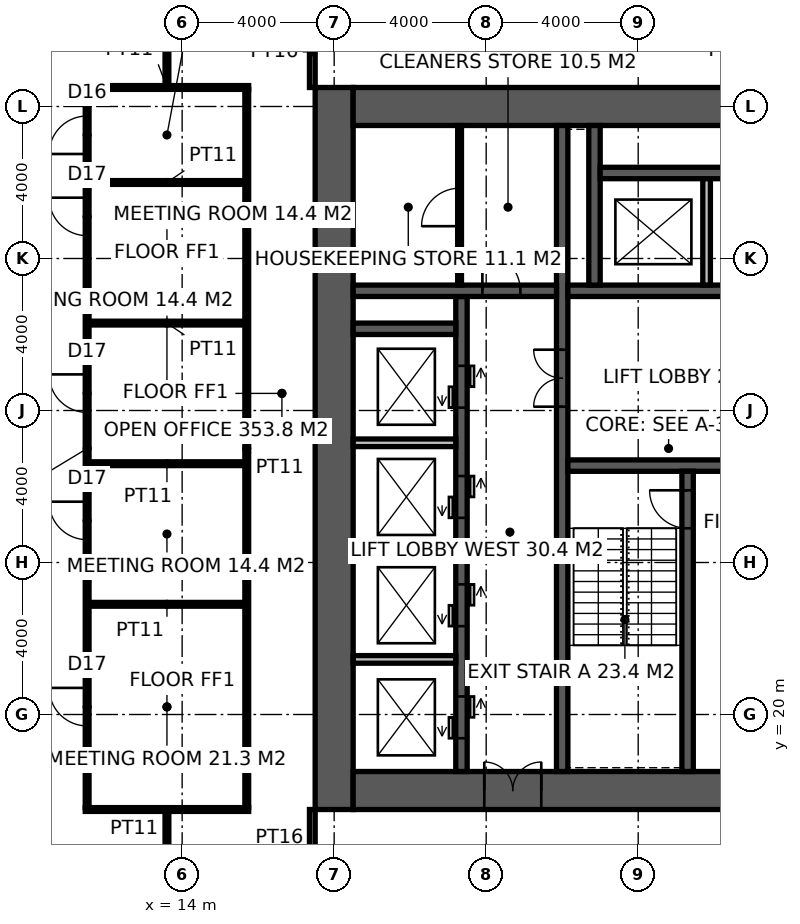
"""IFC4 building model, lengths in metres.
Left out: names, types, materials, properties, quantities, classifications, styles, units other than length and angle.
Written with IfcOpenShell. Run it as: python <this file> out.ifc"""

import sys

from ifc_helpers import new_model, si_unit, direction, frame, frame_2d, origin, place, context, subcontext, project, spatial, rectangle, extrude, element, fill, save


model = new_model("IFC4")
c1 = context("Model", 3, precision=1e-05, world=origin(), true_north=direction((0.0, 1.0)))
c2 = subcontext(c1, "Body", "Model", "MODEL_VIEW")
j1 = project(units=[si_unit("LENGTHUNIT", "METRE"), si_unit("PLANEANGLEUNIT", "RADIAN")], contexts=[c1])
p1 = place(None, origin())
s1 = spatial("IfcSite", under=j1, at=p1, CompositionType="ELEMENT")
p2 = place(p1, origin())
s2 = spatial("IfcBuilding", under=s1, at=p2, CompositionType="ELEMENT")
p3 = place(p2, frame((0.0, 0.0, 159.8)))
s3 = spatial("IfcBuildingStorey", under=s2, at=p3, CompositionType="ELEMENT", Elevation=159.8)
p4 = place(p3, frame((18.0, 17.5, -0.15), z_axis=(0.0, 0.0, 1.0), x_axis=(0.0, 1.0, 0.0)))
e1 = element("IfcWall", 1, at=p4, inside=s3, PredefinedType="SHEAR", context=c2, shape_type="SweptSolid", body=[
    extrude(rectangle(XDim=19.0, YDim=1.0, at=frame_2d((9.5, 0.0))), origin(), (0.0, 0.0, 1.0), 4.0),
])
p5 = place(p3, frame((18.5, 18.0, -0.15), z_axis=(0.0, 0.0, 1.0), x_axis=(1.0, 0.0, 0.0)))
e2 = element("IfcWall", 2, at=p5, inside=s3, PredefinedType="SHEAR", context=c2, shape_type="SweptSolid", body=[
    extrude(rectangle(XDim=17.6, YDim=1.0, at=frame_2d((8.8, 0.0))), origin(), (0.0, 0.0, 1.0), 4.0),
])
p6 = place(p5, frame((3.45, 0.0, 0.15)))
e3 = element("IfcOpeningElement", 3, at=p6, cuts=e2, PredefinedType="OPENING", context=c2, shape_type="SweptSolid", body=[
    extrude(rectangle(XDim=1.5, YDim=2.4, at=frame_2d((0.75, 1.2))), frame((0.0, 0.51, 0.0), z_axis=(0.0, -1.0, 0.0), x_axis=(1.0, 0.0, 0.0)), (0.0, 0.0, 1.0), 1.02),
])
p7 = place(p3, frame((18.5, 36.0, -0.15), z_axis=(0.0, 0.0, 1.0), x_axis=(1.0, 0.0, 0.0)))
e4 = element("IfcWall", 4, at=p7, inside=s3, PredefinedType="SHEAR", context=c2, shape_type="SweptSolid", body=[
    extrude(rectangle(XDim=17.6, YDim=1.0, at=frame_2d((8.8, 0.0))), origin(), (0.0, 0.0, 1.0), 4.0),
])
p8 = place(p3, frame((24.0, 18.5, -0.15), z_axis=(0.0, 0.0, 1.0), x_axis=(0.0, 1.0, 0.0)))
e5 = element("IfcWall", 5, at=p8, inside=s3, PredefinedType="SHEAR", context=c2, shape_type="SweptSolid", body=[
    extrude(rectangle(XDim=17.0, YDim=0.3, at=frame_2d((8.5, 0.0))), origin(), (0.0, 0.0, 1.0), 4.0),
])
p9 = place(p8, frame((9.6, 0.0, 0.15)))
e6 = element("IfcOpeningElement", 6, at=p9, cuts=e5, PredefinedType="OPENING", context=c2, shape_type="SweptSolid", body=[
    extrude(rectangle(XDim=1.5, YDim=2.4, at=frame_2d((0.75, 1.2))), frame((0.0, 0.16, 0.0), z_axis=(0.0, -1.0, 0.0), x_axis=(1.0, 0.0, 0.0)), (0.0, 0.0, 1.0), 0.32),
])
p10 = place(p3, frame((24.15, 26.55, -0.15), z_axis=(0.0, 0.0, 1.0), x_axis=(1.0, 0.0, 0.0)))
e7 = element("IfcWall", 7, at=p10, inside=s3, PredefinedType="SHEAR", context=c2, shape_type="SweptSolid", body=[
    extrude(rectangle(XDim=11.25, YDim=0.3, at=frame_2d((5.625, 0.0))), origin(), (0.0, 0.0, 1.0), 4.0),
])
p11 = place(p10, frame((9.25, 0.0, 0.15)))
e8 = element("IfcOpeningElement", 8, at=p11, cuts=e7, PredefinedType="OPENING", context=c2, shape_type="SweptSolid", body=[
    extrude(rectangle(XDim=1.0, YDim=2.2, at=frame_2d((0.5, 1.1))), frame((0.0, 0.16, 0.0), z_axis=(0.0, -1.0, 0.0), x_axis=(1.0, 0.0, 0.0)), (0.0, 0.0, 1.0), 0.32),
])
p12 = place(p10, frame((4.9, 0.0, 0.15)))
e9 = element("IfcOpeningElement", 9, at=p12, cuts=e7, PredefinedType="OPENING", context=c2, shape_type="SweptSolid", body=[
    extrude(rectangle(XDim=1.5, YDim=2.4, at=frame_2d((0.75, 1.2))), frame((0.0, 0.16, 0.0), z_axis=(0.0, -1.0, 0.0), x_axis=(1.0, 0.0, 0.0)), (0.0, 0.0, 1.0), 0.32),
])
p13 = place(p3, frame((27.3, 18.5, -0.15), z_axis=(0.0, 0.0, 1.0), x_axis=(0.0, 1.0, 0.0)))
e10 = element("IfcWall", 10, at=p13, inside=s3, PredefinedType="SHEAR", context=c2, shape_type="SweptSolid", body=[
    extrude(rectangle(XDim=7.9, YDim=0.3, at=frame_2d((3.95, 0.0))), origin(), (0.0, 0.0, 1.0), 4.0),
])
p14 = place(p13, frame((6.4, 0.0, 0.15)))
e11 = element("IfcOpeningElement", 11, at=p14, cuts=e10, PredefinedType="OPENING", context=c2, shape_type="SweptSolid", body=[
    extrude(rectangle(XDim=1.0, YDim=2.2, at=frame_2d((0.5, 1.1))), frame((0.0, 0.16, 0.0), z_axis=(0.0, -1.0, 0.0), x_axis=(1.0, 0.0, 0.0)), (0.0, 0.0, 1.0), 0.32),
])
p15 = place(p3, frame((24.15, 31.15, -0.15), z_axis=(0.0, 0.0, 1.0), x_axis=(1.0, 0.0, 0.0)))
e12 = element("IfcWall", 12, at=p15, inside=s3, PredefinedType="SHEAR", context=c2, shape_type="SweptSolid", body=[
    extrude(rectangle(XDim=11.25, YDim=0.3, at=frame_2d((5.625, 0.0))), origin(), (0.0, 0.0, 1.0), 4.0),
])
p16 = place(p15, frame((7.25, 0.0, 0.15)))
e13 = element("IfcOpeningElement", 13, at=p16, cuts=e12, PredefinedType="OPENING", context=c2, shape_type="SweptSolid", body=[
    extrude(rectangle(XDim=1.4, YDim=2.4, at=frame_2d((0.7, 1.2))), frame((0.0, 0.16, 0.0), z_axis=(0.0, -1.0, 0.0), x_axis=(1.0, 0.0, 0.0)), (0.0, 0.0, 1.0), 0.32),
])
p17 = place(p3, frame((21.35, 18.5, -0.15), z_axis=(0.0, 0.0, 1.0), x_axis=(0.0, 1.0, 0.0)))
e14 = element("IfcWall", 14, at=p17, inside=s3, PredefinedType="SHEAR", context=c2, shape_type="SweptSolid", body=[
    extrude(rectangle(XDim=12.5, YDim=0.3, at=frame_2d((6.25, 0.0))), origin(), (0.0, 0.0, 1.0), 4.0),
])
p18 = place(p17, frame((0.875, 0.0, 0.15)))
e15 = element("IfcOpeningElement", 15, at=p18, cuts=e14, PredefinedType="OPENING", context=c2, shape_type="SweptSolid", body=[
    extrude(rectangle(XDim=1.1, YDim=2.2, at=frame_2d((0.55, 1.1))), frame((0.0, 0.16, 0.0), z_axis=(0.0, -1.0, 0.0), x_axis=(1.0, 0.0, 0.0)), (0.0, 0.0, 1.0), 0.32),
])
p19 = place(p17, frame((3.825, 0.0, 0.15)))
e16 = element("IfcOpeningElement", 16, at=p19, cuts=e14, PredefinedType="OPENING", context=c2, shape_type="SweptSolid", body=[
    extrude(rectangle(XDim=1.1, YDim=2.2, at=frame_2d((0.55, 1.1))), frame((0.0, 0.16, 0.0), z_axis=(0.0, -1.0, 0.0), x_axis=(1.0, 0.0, 0.0)), (0.0, 0.0, 1.0), 0.32),
])
p20 = place(p17, frame((6.675, 0.0, 0.15)))
e17 = element("IfcOpeningElement", 17, at=p20, cuts=e14, PredefinedType="OPENING", context=c2, shape_type="SweptSolid", body=[
    extrude(rectangle(XDim=1.1, YDim=2.2, at=frame_2d((0.55, 1.1))), frame((0.0, 0.16, 0.0), z_axis=(0.0, -1.0, 0.0), x_axis=(1.0, 0.0, 0.0)), (0.0, 0.0, 1.0), 0.32),
])
p21 = place(p17, frame((9.575, 0.0, 0.15)))
e18 = element("IfcOpeningElement", 18, at=p21, cuts=e14, PredefinedType="OPENING", context=c2, shape_type="SweptSolid", body=[
    extrude(rectangle(XDim=1.1, YDim=2.2, at=frame_2d((0.55, 1.1))), frame((0.0, 0.16, 0.0), z_axis=(0.0, -1.0, 0.0), x_axis=(1.0, 0.0, 0.0)), (0.0, 0.0, 1.0), 0.32),
])
p22 = place(p3, frame((18.5, 31.15, -0.15), z_axis=(0.0, 0.0, 1.0), x_axis=(1.0, 0.0, 0.0)))
e19 = element("IfcWall", 19, at=p22, inside=s3, PredefinedType="SHEAR", context=c2, shape_type="SweptSolid", body=[
    extrude(rectangle(XDim=5.35, YDim=0.3, at=frame_2d((2.675, 0.0))), origin(), (0.0, 0.0, 1.0), 4.0),
])
p23 = place(p22, frame((3.4, 0.0, 0.15)))
e20 = element("IfcOpeningElement", 20, at=p23, cuts=e19, PredefinedType="OPENING", context=c2, shape_type="SweptSolid", body=[
    extrude(rectangle(XDim=1.0, YDim=2.2, at=frame_2d((0.5, 1.1))), frame((0.0, 0.16, 0.0), z_axis=(0.0, -1.0, 0.0), x_axis=(1.0, 0.0, 0.0)), (0.0, 0.0, 1.0), 0.32),
])
p24 = place(p3, frame((18.5, 30.15, -0.15), z_axis=(0.0, 0.0, 1.0), x_axis=(1.0, 0.0, 0.0)))
e21 = element("IfcWall", 21, at=p24, inside=s3, PredefinedType="SHEAR", context=c2, shape_type="SweptSolid", body=[
    extrude(rectangle(XDim=2.7, YDim=0.3, at=frame_2d((1.35, 0.0))), origin(), (0.0, 0.0, 1.0), 4.0),
])
p25 = place(p3, frame((24.85, 31.3, -0.15), z_axis=(0.0, 0.0, 1.0), x_axis=(0.0, 1.0, 0.0)))
e22 = element("IfcWall", 22, at=p25, inside=s3, PredefinedType="SHEAR", context=c2, shape_type="SweptSolid", body=[
    extrude(rectangle(XDim=4.2, YDim=0.3, at=frame_2d((2.1, 0.0))), origin(), (0.0, 0.0, 1.0), 4.0),
])
p26 = place(p3, frame((25.0, 34.25, -0.15), z_axis=(0.0, 0.0, 1.0), x_axis=(1.0, 0.0, 0.0)))
e23 = element("IfcWall", 23, at=p26, inside=s3, PredefinedType="SHEAR", context=c2, shape_type="SweptSolid", body=[
    extrude(rectangle(XDim=8.6, YDim=0.3, at=frame_2d((4.3, 0.0))), origin(), (0.0, 0.0, 1.0), 4.0),
])
p27 = place(p3, frame((27.8, 31.3, -0.15), z_axis=(0.0, 0.0, 1.0), x_axis=(0.0, 1.0, 0.0)))
e24 = element("IfcWall", 24, at=p27, inside=s3, PredefinedType="SOLIDWALL", context=c2, shape_type="SweptSolid", body=[
    extrude(rectangle(XDim=2.8, YDim=0.2, at=frame_2d((1.4, 0.0))), origin(), (0.0, 0.0, 1.0), 4.0),
])
for number, where, z_axis, x_axis in (
    (25, (18.5, 21.45, -0.15), (0.0, 0.0, 1.0), (1.0, 0.0, 0.0)),
    (26, (18.5, 24.3, -0.15), (0.0, 0.0, 1.0), (1.0, 0.0, 0.0)),
    (27, (18.5, 27.15, -0.15), (0.0, 0.0, 1.0), (1.0, 0.0, 0.0)),
):
    element("IfcWall", number, at=place(p3, frame(where, z_axis=z_axis, x_axis=x_axis)), inside=s3, PredefinedType="SOLIDWALL", context=c2, shape_type="SweptSolid", body=[
        extrude(rectangle(XDim=2.7, YDim=0.2, at=frame_2d((1.35, 0.0))), origin(), (0.0, 0.0, 1.0), 4.0),
    ])
p28 = place(p3, frame((21.3, 31.3, 0.0), z_axis=(0.0, 0.0, 1.0), x_axis=(0.0, 1.0, 0.0)))
e28 = element("IfcWall", 28, at=p28, inside=s3, PredefinedType="PARTITIONING", context=c2, shape_type="SweptSolid", body=[
    extrude(rectangle(XDim=4.2, YDim=0.1, at=frame_2d((2.1, 0.0))), origin(), (0.0, 0.0, 1.0), 3.85),
])
p29 = place(p28, frame((1.55, 0.0, 0.0)))
e29 = element("IfcOpeningElement", 29, at=p29, cuts=e28, PredefinedType="OPENING", context=c2, shape_type="SweptSolid", body=[
    extrude(rectangle(XDim=1.0, YDim=2.2, at=frame_2d((0.5, 1.1))), frame((0.0, 0.06, 0.0), z_axis=(0.0, -1.0, 0.0), x_axis=(1.0, 0.0, 0.0)), (0.0, 0.0, 1.0), 0.12),
])
p30 = place(p3, frame((17.425, 15.025, 0.0), z_axis=(0.0, 0.0, 1.0), x_axis=(0.0, 1.0, 0.0)))
e30 = element("IfcWall", 30, at=p30, inside=s3, PredefinedType="PARTITIONING", context=c2, shape_type="SweptSolid", body=[
    extrude(rectangle(XDim=2.475, YDim=0.15, at=frame_2d((1.238, 0.0))), origin(), (0.0, 0.0, 1.0), 3.85),
])
p31 = place(p3, frame((17.425, 36.5, 0.0), z_axis=(0.0, 0.0, 1.0), x_axis=(0.0, 1.0, 0.0)))
e31 = element("IfcWall", 31, at=p31, inside=s3, PredefinedType="PARTITIONING", context=c2, shape_type="SweptSolid", body=[
    extrude(rectangle(XDim=1.875, YDim=0.15, at=frame_2d((0.938, 0.0))), origin(), (0.0, 0.0, 1.0), 3.85),
])
p32 = place(p3, frame((11.45, 17.5, 0.0), z_axis=(0.0, 0.0, 1.0), x_axis=(1.0, 0.0, 0.0)))
e32 = element("IfcWall", 32, at=p32, inside=s3, PredefinedType="PARTITIONING", context=c2, shape_type="SweptSolid", body=[
    extrude(rectangle(XDim=4.3, YDim=0.1, at=frame_2d((2.15, 0.0))), origin(), (0.0, 0.0, 1.0), 3.85),
])
for number, where, z_axis, x_axis in (
    (33, (11.55, 22.9, 0.0), (0.0, 0.0, 1.0), (1.0, 0.0, 0.0)),
    (34, (11.55, 26.6, 0.0), (0.0, 0.0, 1.0), (1.0, 0.0, 0.0)),
    (35, (11.55, 30.3, 0.0), (0.0, 0.0, 1.0), (1.0, 0.0, 0.0)),
    (36, (11.55, 34.0, 0.0), (0.0, 0.0, 1.0), (1.0, 0.0, 0.0)),
):
    element("IfcWall", number, at=place(p3, frame(where, z_axis=z_axis, x_axis=x_axis)), inside=s3, PredefinedType="PARTITIONING", context=c2, shape_type="SweptSolid", body=[
        extrude(rectangle(XDim=4.1, YDim=0.1, at=frame_2d((2.05, 0.0))), origin(), (0.0, 0.0, 1.0), 3.85),
    ])
p33 = place(p3, frame((11.45, 36.5, 0.0), z_axis=(0.0, 0.0, 1.0), x_axis=(1.0, 0.0, 0.0)))
e37 = element("IfcWall", 37, at=p33, inside=s3, PredefinedType="PARTITIONING", context=c2, shape_type="SweptSolid", body=[
    extrude(rectangle(XDim=4.3, YDim=0.1, at=frame_2d((2.15, 0.0))), origin(), (0.0, 0.0, 1.0), 2.85),
])
p34 = place(p3, frame((11.5, 17.55, 0.0), z_axis=(0.0, 0.0, 1.0), x_axis=(0.0, 1.0, 0.0)))
e38 = element("IfcWall", 38, at=p34, inside=s3, PredefinedType="PARTITIONING", context=c2, shape_type="SweptSolid", body=[
    extrude(rectangle(XDim=18.9, YDim=0.1, at=frame_2d((9.45, 0.0))), origin(), (0.0, 0.0, 1.0), 3.85),
])
p35 = place(p34, frame((2.15, 0.0, 0.0)))
e39 = element("IfcOpeningElement", 39, at=p35, cuts=e38, PredefinedType="OPENING", context=c2, shape_type="SweptSolid", body=[
    extrude(rectangle(XDim=1.0, YDim=2.2, at=frame_2d((0.5, 1.1))), frame((0.0, 0.06, 0.0), z_axis=(0.0, -1.0, 0.0), x_axis=(1.0, 0.0, 0.0)), (0.0, 0.0, 1.0), 0.12),
])
p36 = place(p34, frame((7.05, 0.0, 0.0)))
e40 = element("IfcOpeningElement", 40, at=p36, cuts=e38, PredefinedType="OPENING", context=c2, shape_type="SweptSolid", body=[
    extrude(rectangle(XDim=1.0, YDim=2.2, at=frame_2d((0.5, 1.1))), frame((0.0, 0.06, 0.0), z_axis=(0.0, -1.0, 0.0), x_axis=(1.0, 0.0, 0.0)), (0.0, 0.0, 1.0), 0.12),
])
p37 = place(p34, frame((10.4, 0.0, 0.0)))
e41 = element("IfcOpeningElement", 41, at=p37, cuts=e38, PredefinedType="OPENING", context=c2, shape_type="SweptSolid", body=[
    extrude(rectangle(XDim=1.0, YDim=2.2, at=frame_2d((0.5, 1.1))), frame((0.0, 0.06, 0.0), z_axis=(0.0, -1.0, 0.0), x_axis=(1.0, 0.0, 0.0)), (0.0, 0.0, 1.0), 0.12),
])
p38 = place(p34, frame((15.05, 0.0, 0.0)))
e42 = element("IfcOpeningElement", 42, at=p38, cuts=e38, PredefinedType="OPENING", context=c2, shape_type="SweptSolid", body=[
    extrude(rectangle(XDim=1.0, YDim=2.2, at=frame_2d((0.5, 1.1))), frame((0.0, 0.06, 0.0), z_axis=(0.0, -1.0, 0.0), x_axis=(1.0, 0.0, 0.0)), (0.0, 0.0, 1.0), 0.12),
])
p39 = place(p34, frame((17.2, 0.0, 0.0)))
e43 = element("IfcOpeningElement", 43, at=p39, cuts=e38, PredefinedType="OPENING", context=c2, shape_type="SweptSolid", body=[
    extrude(rectangle(XDim=1.0, YDim=2.2, at=frame_2d((0.5, 1.1))), frame((0.0, 0.06, 0.0), z_axis=(0.0, -1.0, 0.0), x_axis=(1.0, 0.0, 0.0)), (0.0, 0.0, 1.0), 0.12),
])
p40 = place(p3, frame((15.7, 17.55, 0.0), z_axis=(0.0, 0.0, 1.0), x_axis=(0.0, 1.0, 0.0)))
e44 = element("IfcWall", 44, at=p40, inside=s3, PredefinedType="PARTITIONING", context=c2, shape_type="SweptSolid", body=[
    extrude(rectangle(XDim=18.9, YDim=0.1, at=frame_2d((9.45, 0.0))), origin(), (0.0, 0.0, 1.0), 3.85),
])
p41 = place(p3, frame((13.6, 4.3, 0.0), z_axis=(0.0, 0.0, 1.0), x_axis=(0.0, 1.0, 0.0)))
e45 = element("IfcWall", 45, at=p41, inside=s3, PredefinedType="PARTITIONING", context=c2, shape_type="SweptSolid", body=[
    extrude(rectangle(XDim=13.15, YDim=0.1, at=frame_2d((6.575, 0.0))), origin(), (0.0, 0.0, 1.0), 3.85),
])
p42 = place(p3, frame((13.6, 36.55, 0.0), z_axis=(0.0, 0.0, 1.0), x_axis=(0.0, 1.0, 0.0)))
e46 = element("IfcWall", 46, at=p42, inside=s3, PredefinedType="PARTITIONING", context=c2, shape_type="SweptSolid", body=[
    extrude(rectangle(XDim=15.15, YDim=0.1, at=frame_2d((7.575, 0.0))), origin(), (0.0, 0.0, 1.0), 3.85),
])
p43 = place(p42, frame((7.075, 0.0, 0.0)))
e47 = element("IfcOpeningElement", 47, at=p43, cuts=e46, PredefinedType="OPENING", context=c2, shape_type="SweptSolid", body=[
    extrude(rectangle(XDim=1.0, YDim=2.2, at=frame_2d((0.5, 1.1))), frame((0.0, 0.06, 0.0), z_axis=(0.0, -1.0, 0.0), x_axis=(1.0, 0.0, 0.0)), (0.0, 0.0, 1.0), 0.12),
])
p44 = place(p14, origin())
e48 = element("IfcDoor", 48, at=p44, inside=s3, OperationType="SINGLE_SWING_RIGHT", PredefinedType="DOOR", context=c2, shape_type="SweptSolid", body=[
    extrude(rectangle(XDim=1.0, YDim=2.2, at=frame_2d((0.5, 1.1))), frame((0.0, 0.025, 0.0), z_axis=(0.0, -1.0, 0.0), x_axis=(1.0, 0.0, 0.0)), (0.0, 0.0, 1.0), 0.05),
])
fill(e11, e48)
p45 = place(p9, origin())
e49 = element("IfcDoor", 49, at=p45, inside=s3, OperationType="DOUBLE_DOOR_DOUBLE_SWING", PredefinedType="DOOR", context=c2, shape_type="SweptSolid", body=[
    extrude(rectangle(XDim=1.5, YDim=2.4, at=frame_2d((0.75, 1.2))), frame((0.0, 0.025, 0.0), z_axis=(0.0, -1.0, 0.0), x_axis=(1.0, 0.0, 0.0)), (0.0, 0.0, 1.0), 0.05),
])
fill(e6, e49)
p46 = place(p23, origin())
e50 = element("IfcDoor", 50, at=p46, inside=s3, OperationType="SINGLE_SWING_LEFT", PredefinedType="DOOR", context=c2, shape_type="SweptSolid", body=[
    extrude(rectangle(XDim=1.0, YDim=2.2, at=frame_2d((0.5, 1.1))), frame((0.0, 0.025, 0.0), z_axis=(0.0, -1.0, 0.0), x_axis=(1.0, 0.0, 0.0)), (0.0, 0.0, 1.0), 0.05),
])
fill(e20, e50)
p47 = place(p29, origin())
e51 = element("IfcDoor", 51, at=p47, inside=s3, OperationType="SINGLE_SWING_LEFT", PredefinedType="DOOR", context=c2, shape_type="SweptSolid", body=[
    extrude(rectangle(XDim=1.0, YDim=2.2, at=frame_2d((0.5, 1.1))), frame((0.0, 0.025, 0.0), z_axis=(0.0, -1.0, 0.0), x_axis=(1.0, 0.0, 0.0)), (0.0, 0.0, 1.0), 0.05),
])
fill(e29, e51)
p48 = place(p6, origin())
e52 = element("IfcDoor", 52, at=p48, inside=s3, OperationType="DOUBLE_DOOR_DOUBLE_SWING", PredefinedType="DOOR", context=c2, shape_type="SweptSolid", body=[
    extrude(rectangle(XDim=1.5, YDim=2.4, at=frame_2d((0.75, 1.2))), frame((0.0, 0.025, 0.0), z_axis=(0.0, -1.0, 0.0), x_axis=(1.0, 0.0, 0.0)), (0.0, 0.0, 1.0), 0.05),
])
fill(e3, e52)
p49 = place(p35, origin())
e53 = element("IfcDoor", 53, at=p49, inside=s3, OperationType="SINGLE_SWING_RIGHT", PredefinedType="DOOR", context=c2, shape_type="SweptSolid", body=[
    extrude(rectangle(XDim=1.0, YDim=2.2, at=frame_2d((0.5, 1.1))), frame((0.0, 0.025, 0.0), z_axis=(0.0, -1.0, 0.0), x_axis=(1.0, 0.0, 0.0)), (0.0, 0.0, 1.0), 0.05),
])
fill(e39, e53)
p50 = place(p36, origin())
e54 = element("IfcDoor", 54, at=p50, inside=s3, OperationType="SINGLE_SWING_RIGHT", PredefinedType="DOOR", context=c2, shape_type="SweptSolid", body=[
    extrude(rectangle(XDim=1.0, YDim=2.2, at=frame_2d((0.5, 1.1))), frame((0.0, 0.025, 0.0), z_axis=(0.0, -1.0, 0.0), x_axis=(1.0, 0.0, 0.0)), (0.0, 0.0, 1.0), 0.05),
])
fill(e40, e54)
p51 = place(p37, origin())
e55 = element("IfcDoor", 55, at=p51, inside=s3, OperationType="SINGLE_SWING_RIGHT", PredefinedType="DOOR", context=c2, shape_type="SweptSolid", body=[
    extrude(rectangle(XDim=1.0, YDim=2.2, at=frame_2d((0.5, 1.1))), frame((0.0, 0.025, 0.0), z_axis=(0.0, -1.0, 0.0), x_axis=(1.0, 0.0, 0.0)), (0.0, 0.0, 1.0), 0.05),
])
fill(e41, e55)
p52 = place(p38, origin())
e56 = element("IfcDoor", 56, at=p52, inside=s3, OperationType="SINGLE_SWING_RIGHT", PredefinedType="DOOR", context=c2, shape_type="SweptSolid", body=[
    extrude(rectangle(XDim=1.0, YDim=2.2, at=frame_2d((0.5, 1.1))), frame((0.0, 0.025, 0.0), z_axis=(0.0, -1.0, 0.0), x_axis=(1.0, 0.0, 0.0)), (0.0, 0.0, 1.0), 0.05),
])
fill(e42, e56)
p53 = place(p39, origin())
e57 = element("IfcDoor", 57, at=p53, inside=s3, OperationType="SINGLE_SWING_LEFT", PredefinedType="DOOR", context=c2, shape_type="SweptSolid", body=[
    extrude(rectangle(XDim=1.0, YDim=2.2, at=frame_2d((0.5, 1.1))), frame((0.0, 0.025, 0.0), z_axis=(0.0, -1.0, 0.0), x_axis=(1.0, 0.0, 0.0)), (0.0, 0.0, 1.0), 0.05),
])
fill(e43, e57)
p54 = place(p18, origin())
e58 = element("IfcDoor", 58, at=p54, inside=s3, OperationType="DOUBLE_DOOR_SLIDING", PredefinedType="DOOR", context=c2, shape_type="SweptSolid", body=[
    extrude(rectangle(XDim=1.1, YDim=2.2, at=frame_2d((0.55, 1.1))), frame((0.0, 0.025, 0.0), z_axis=(0.0, -1.0, 0.0), x_axis=(1.0, 0.0, 0.0)), (0.0, 0.0, 1.0), 0.05),
])
fill(e15, e58)
p55 = place(p19, origin())
e59 = element("IfcDoor", 59, at=p55, inside=s3, OperationType="DOUBLE_DOOR_SLIDING", PredefinedType="DOOR", context=c2, shape_type="SweptSolid", body=[
    extrude(rectangle(XDim=1.1, YDim=2.2, at=frame_2d((0.55, 1.1))), frame((0.0, 0.025, 0.0), z_axis=(0.0, -1.0, 0.0), x_axis=(1.0, 0.0, 0.0)), (0.0, 0.0, 1.0), 0.05),
])
fill(e16, e59)
p56 = place(p20, origin())
e60 = element("IfcDoor", 60, at=p56, inside=s3, OperationType="DOUBLE_DOOR_SLIDING", PredefinedType="DOOR", context=c2, shape_type="SweptSolid", body=[
    extrude(rectangle(XDim=1.1, YDim=2.2, at=frame_2d((0.55, 1.1))), frame((0.0, 0.025, 0.0), z_axis=(0.0, -1.0, 0.0), x_axis=(1.0, 0.0, 0.0)), (0.0, 0.0, 1.0), 0.05),
])
fill(e17, e60)
p57 = place(p21, origin())
e61 = element("IfcDoor", 61, at=p57, inside=s3, OperationType="DOUBLE_DOOR_SLIDING", PredefinedType="DOOR", context=c2, shape_type="SweptSolid", body=[
    extrude(rectangle(XDim=1.1, YDim=2.2, at=frame_2d((0.55, 1.1))), frame((0.0, 0.025, 0.0), z_axis=(0.0, -1.0, 0.0), x_axis=(1.0, 0.0, 0.0)), (0.0, 0.0, 1.0), 0.05),
])
fill(e18, e61)
save(model, sys.argv[1])
